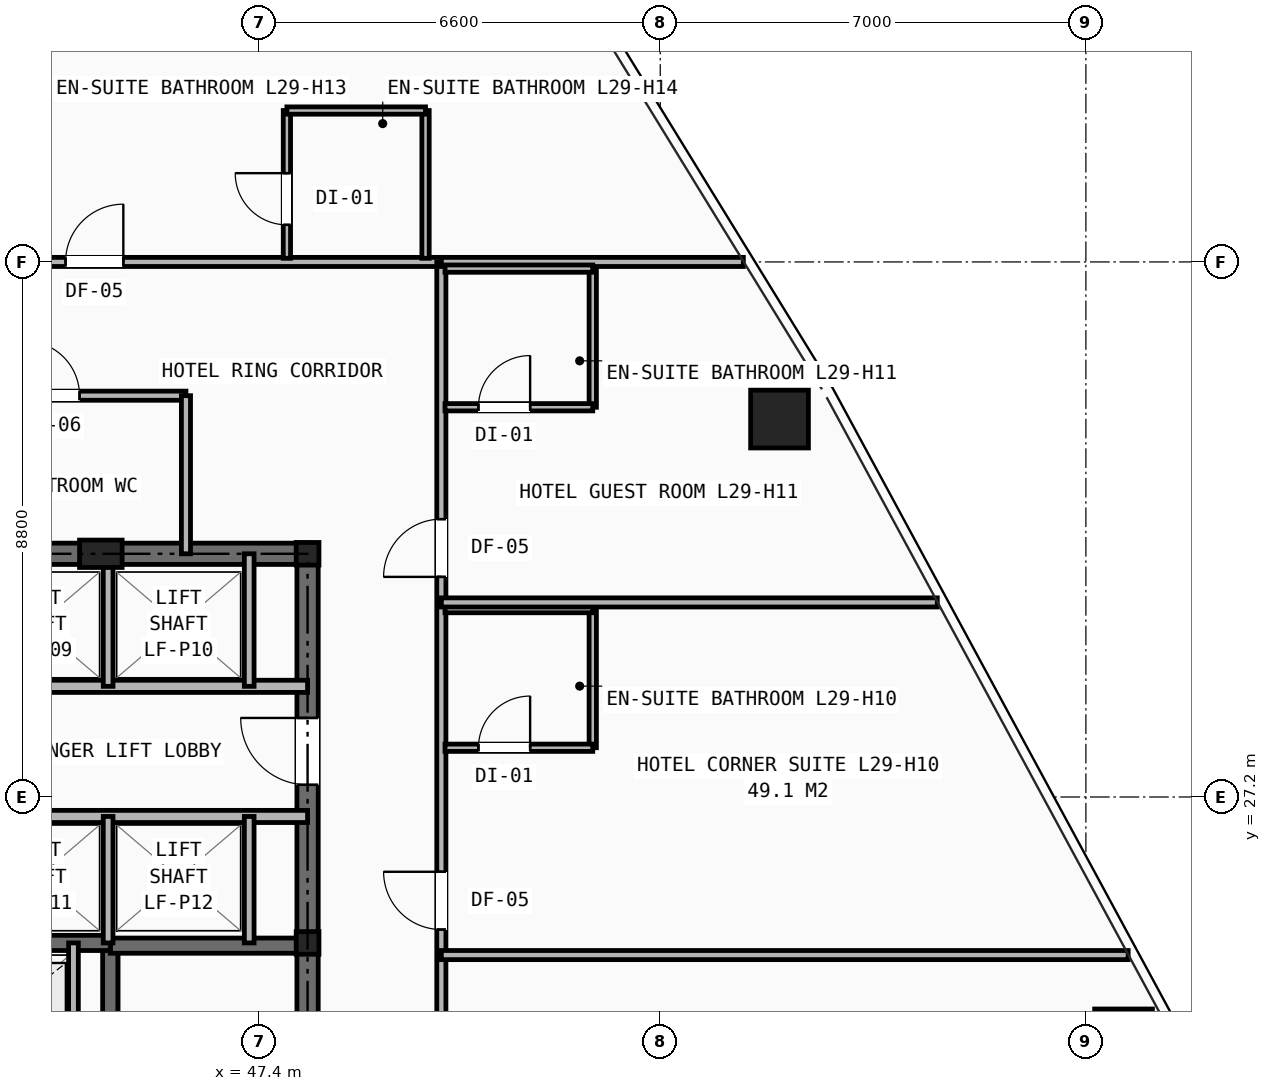
"""IFC4 building model, lengths in metres.
Left out: names, types, materials, properties, quantities, classifications, styles, units other than length and angle.
Written with IfcOpenShell. Run it as: python <this file> out.ifc"""

import sys

from ifc_helpers import new_model, si_unit, direction, frame, frame_2d, origin, origin_2d, place, context, subcontext, project, spatial, rectangle, hollow_rectangle, i_section, extrude, element, fill, save


model = new_model("IFC4")
c1 = context("Model", 3, precision=1e-05, world=origin(), true_north=direction((0.0, 1.0)))
c2 = subcontext(c1, "Body", "Model", "MODEL_VIEW")
j1 = project(units=[si_unit("LENGTHUNIT", "METRE"), si_unit("PLANEANGLEUNIT", "RADIAN")], contexts=[c1])
p1 = place(None, origin())
s1 = spatial("IfcSite", under=j1, at=p1, CompositionType="ELEMENT")
p2 = place(p1, origin())
s2 = spatial("IfcBuilding", under=s1, at=p2, CompositionType="ELEMENT")
p3 = place(p2, frame((0.0, 0.0, 102.2)))
s3 = spatial("IfcBuildingStorey", under=s2, at=p3, CompositionType="ELEMENT", Elevation=102.2)
for number, where, z_axis, x_axis in (
    (1, (48.2, 24.8, 0.0), (0.0, 0.0, 1.0), (1.0, 0.0, 0.0)),
    (2, (48.2, 31.2, 0.0), (0.0, 0.0, 1.0), (1.0, 0.0, 0.0)),
):
    element("IfcColumn", number, at=place(p3, frame(where, z_axis=z_axis, x_axis=x_axis)), inside=s3, PredefinedType="COLUMN", context=c2, shape_type="SweptSolid", body=[
        extrude(i_section(OverallWidth=0.374, OverallDepth=0.372, WebThickness=0.016, FlangeThickness=0.026, at=origin_2d()), origin(), (0.0, 0.0, 1.0), 3.2),
    ])
p4 = place(p3, frame((44.8, 31.2, 0.0), z_axis=(0.0, 0.0, 1.0), x_axis=(1.0, 0.0, 0.0)))
e3 = element("IfcColumn", 3, at=p4, inside=s3, PredefinedType="PILASTER", context=c2, shape_type="SweptSolid", body=[
    extrude(rectangle(XDim=0.7, YDim=0.45, at=origin_2d()), origin(), (0.0, 0.0, 1.0), 3.2),
])
for number, where, z_axis, x_axis in (
    (4, (61.619, 23.238, 0.0), (0.0, 0.0, 1.0), (1.0, 0.0, 0.0)),
    (5, (55.962, 33.416, 0.0), (0.0, 0.0, 1.0), (1.0, 0.0, 0.0)),
):
    element("IfcColumn", number, at=place(p3, frame(where, z_axis=z_axis, x_axis=x_axis)), inside=s3, PredefinedType="COLUMN", context=c2, shape_type="SweptSolid", body=[
        extrude(hollow_rectangle(XDim=0.95, YDim=0.95, WallThickness=0.065, at=origin_2d()), origin(), (0.0, 0.0, 1.0), 3.2),
    ])
p5 = place(p3, frame((31.8, 31.2, 0.0), z_axis=(0.0, 0.0, 1.0), x_axis=(1.0, 0.0, 0.0)))
e6 = element("IfcWall", 6, at=p5, inside=s3, PredefinedType="SHEAR", context=c2, shape_type="SweptSolid", body=[
    extrude(rectangle(XDim=16.4, YDim=0.35, at=frame_2d((8.2, 0.0))), origin(), (0.0, 0.0, 1.0), 2.97),
])
p6 = place(p3, frame((48.2, 16.4, 0.0), z_axis=(0.0, 0.0, 1.0), x_axis=(0.0, 1.0, 0.0)))
e7 = element("IfcWall", 7, at=p6, inside=s3, PredefinedType="SHEAR", context=c2, shape_type="SweptSolid", body=[
    extrude(rectangle(XDim=14.8, YDim=0.35, at=frame_2d((7.4, 0.0))), origin(), (0.0, 0.0, 1.0), 2.97),
])
p7 = place(p6, frame((11.0, 0.0, 0.0)))
e8 = element("IfcOpeningElement", 8, at=p7, cuts=e7, PredefinedType="OPENING", context=c2, shape_type="SweptSolid", body=[
    extrude(rectangle(XDim=1.1, YDim=2.15, at=frame_2d((0.55, 1.075))), frame((0.0, 0.185, 0.0), z_axis=(0.0, -1.0, 0.0), x_axis=(1.0, 0.0, 0.0)), (0.0, 0.0, 1.0), 0.37),
])
p8 = place(p3, frame((44.955, 16.4, 0.0), z_axis=(0.0, 0.0, 1.0), x_axis=(0.0, 1.0, 0.0)))
e9 = element("IfcWall", 9, at=p8, inside=s3, PredefinedType="SHEAR", context=c2, shape_type="SweptSolid", body=[
    extrude(rectangle(XDim=8.4, YDim=0.25, at=frame_2d((4.2, 0.0))), origin(), (0.0, 0.0, 1.0), 2.97),
])
p9 = place(p8, frame((0.45, 0.0, 0.0)))
e10 = element("IfcOpeningElement", 10, at=p9, cuts=e9, PredefinedType="OPENING", context=c2, shape_type="SweptSolid", body=[
    extrude(rectangle(XDim=0.95, YDim=2.1, at=frame_2d((0.475, 1.05))), frame((0.0, 0.135, 0.0), z_axis=(0.0, -1.0, 0.0), x_axis=(1.0, 0.0, 0.0)), (0.0, 0.0, 1.0), 0.27),
])
p10 = place(p3, frame((44.955, 24.755, 0.0), z_axis=(0.0, 0.0, 1.0), x_axis=(1.0, 0.0, 0.0)))
e11 = element("IfcWall", 11, at=p10, inside=s3, PredefinedType="SHEAR", context=c2, shape_type="SweptSolid", body=[
    extrude(rectangle(XDim=3.245, YDim=0.25, at=frame_2d((1.623, 0.0))), origin(), (0.0, 0.0, 1.0), 2.97),
])
p11 = place(p3, frame((35.045, 24.8, 0.0), z_axis=(0.0, 0.0, 1.0), x_axis=(1.0, 0.0, 0.0)))
e12 = element("IfcWall", 12, at=p11, inside=s3, PredefinedType="SHEAR", context=c2, shape_type="SweptSolid", body=[
    extrude(rectangle(XDim=9.91, YDim=0.25, at=frame_2d((4.955, 0.0))), origin(), (0.0, 0.0, 1.0), 2.97),
])
p12 = place(p3, frame((44.35, 22.48, 0.0), z_axis=(0.0, 0.0, 1.0), x_axis=(0.0, 1.0, 0.0)))
e13 = element("IfcWall", 13, at=p12, inside=s3, PredefinedType="SOLIDWALL", context=c2, shape_type="SweptSolid", body=[
    extrude(rectangle(XDim=2.32, YDim=0.16, at=frame_2d((1.16, 0.0))), origin(), (0.0, 0.0, 1.0), 2.97),
])
p13 = place(p3, frame((31.8, 29.02, 0.0), z_axis=(0.0, 0.0, 1.0), x_axis=(1.0, 0.0, 0.0)))
e14 = element("IfcWall", 14, at=p13, inside=s3, PredefinedType="SOLIDWALL", context=c2, shape_type="SweptSolid", body=[
    extrude(rectangle(XDim=16.4, YDim=0.2, at=frame_2d((8.2, 0.0))), origin(), (0.0, 0.0, 1.0), 2.421),
])
p14 = place(p13, frame((0.55, 0.0, 0.0)))
e15 = element("IfcOpeningElement", 15, at=p14, cuts=e14, PredefinedType="OPENING", context=c2, shape_type="SweptSolid", body=[
    extrude(rectangle(XDim=0.85, YDim=2.05, at=frame_2d((0.425, 1.025))), frame((0.0, 0.11, 0.0), z_axis=(0.0, -1.0, 0.0), x_axis=(1.0, 0.0, 0.0)), (0.0, 0.0, 1.0), 0.22),
])
p15 = place(p13, frame((2.55, 0.0, 0.0)))
e16 = element("IfcOpeningElement", 16, at=p15, cuts=e14, PredefinedType="OPENING", context=c2, shape_type="SweptSolid", body=[
    extrude(rectangle(XDim=1.1, YDim=2.15, at=frame_2d((0.55, 1.075))), frame((0.0, 0.11, 0.0), z_axis=(0.0, -1.0, 0.0), x_axis=(1.0, 0.0, 0.0)), (0.0, 0.0, 1.0), 0.22),
])
p16 = place(p13, frame((4.71, 0.0, 0.0)))
e17 = element("IfcOpeningElement", 17, at=p16, cuts=e14, PredefinedType="OPENING", context=c2, shape_type="SweptSolid", body=[
    extrude(rectangle(XDim=1.1, YDim=2.15, at=frame_2d((0.55, 1.075))), frame((0.0, 0.11, 0.0), z_axis=(0.0, -1.0, 0.0), x_axis=(1.0, 0.0, 0.0)), (0.0, 0.0, 1.0), 0.22),
])
p17 = place(p13, frame((6.87, 0.0, 0.0)))
e18 = element("IfcOpeningElement", 18, at=p17, cuts=e14, PredefinedType="OPENING", context=c2, shape_type="SweptSolid", body=[
    extrude(rectangle(XDim=1.1, YDim=2.15, at=frame_2d((0.55, 1.075))), frame((0.0, 0.11, 0.0), z_axis=(0.0, -1.0, 0.0), x_axis=(1.0, 0.0, 0.0)), (0.0, 0.0, 1.0), 0.22),
])
p18 = place(p13, frame((9.03, 0.0, 0.0)))
e19 = element("IfcOpeningElement", 19, at=p18, cuts=e14, PredefinedType="OPENING", context=c2, shape_type="SweptSolid", body=[
    extrude(rectangle(XDim=1.1, YDim=2.15, at=frame_2d((0.55, 1.075))), frame((0.0, 0.11, 0.0), z_axis=(0.0, -1.0, 0.0), x_axis=(1.0, 0.0, 0.0)), (0.0, 0.0, 1.0), 0.22),
])
p19 = place(p3, frame((33.82, 26.88, 0.0), z_axis=(0.0, 0.0, 1.0), x_axis=(1.0, 0.0, 0.0)))
e20 = element("IfcWall", 20, at=p19, inside=s3, PredefinedType="SOLIDWALL", context=c2, shape_type="SweptSolid", body=[
    extrude(rectangle(XDim=14.38, YDim=0.2, at=frame_2d((7.19, 0.0))), origin(), (0.0, 0.0, 1.0), 2.421),
])
for number, where, z_axis, x_axis in (
    (21, (44.92, 29.02, 0.0), (0.0, 0.0, 1.0), (0.0, 1.0, 0.0)),
    (22, (47.24, 29.02, 0.0), (0.0, 0.0, 1.0), (0.0, 1.0, 0.0)),
):
    element("IfcWall", number, at=place(p3, frame(where, z_axis=z_axis, x_axis=x_axis)), inside=s3, PredefinedType="SOLIDWALL", context=c2, shape_type="SweptSolid", body=[
        extrude(rectangle(XDim=2.18, YDim=0.16, at=frame_2d((1.09, 0.0))), origin(), (0.0, 0.0, 1.0), 2.421),
    ])
for number, where, z_axis, x_axis in (
    (23, (44.92, 24.8, 0.0), (0.0, 0.0, 1.0), (0.0, 1.0, 0.0)),
    (24, (47.24, 24.8, 0.0), (0.0, 0.0, 1.0), (0.0, 1.0, 0.0)),
):
    element("IfcWall", number, at=place(p3, frame(where, z_axis=z_axis, x_axis=x_axis)), inside=s3, PredefinedType="SOLIDWALL", context=c2, shape_type="SweptSolid", body=[
        extrude(rectangle(XDim=2.08, YDim=0.16, at=frame_2d((1.04, 0.0))), origin(), (0.0, 0.0, 1.0), 2.97),
    ])
p20 = place(p3, frame((33.2, 33.8, 0.0), z_axis=(0.0, 0.0, 1.0), x_axis=(1.0, 0.0, 0.0)))
e25 = element("IfcWall", 25, at=p20, inside=s3, PredefinedType="PARTITIONING", context=c2, shape_type="SweptSolid", body=[
    extrude(rectangle(XDim=13.0, YDim=0.15, at=frame_2d((6.5, 0.0))), origin(), (0.0, 0.0, 1.0), 2.97),
])
p21 = place(p20, frame((1.7, 0.0, 0.0)))
e26 = element("IfcOpeningElement", 26, at=p21, cuts=e25, PredefinedType="OPENING", context=c2, shape_type="SweptSolid", body=[
    extrude(rectangle(XDim=0.9, YDim=2.1, at=frame_2d((0.45, 1.05))), frame((0.0, 0.085, 0.0), z_axis=(0.0, -1.0, 0.0), x_axis=(1.0, 0.0, 0.0)), (0.0, 0.0, 1.0), 0.17),
])
p22 = place(p20, frame((6.0, 0.0, 0.0)))
e27 = element("IfcOpeningElement", 27, at=p22, cuts=e25, PredefinedType="OPENING", context=c2, shape_type="SweptSolid", body=[
    extrude(rectangle(XDim=0.9, YDim=2.1, at=frame_2d((0.45, 1.05))), frame((0.0, 0.085, 0.0), z_axis=(0.0, -1.0, 0.0), x_axis=(1.0, 0.0, 0.0)), (0.0, 0.0, 1.0), 0.17),
])
p23 = place(p20, frame((10.35, 0.0, 0.0)))
e28 = element("IfcOpeningElement", 28, at=p23, cuts=e25, PredefinedType="OPENING", context=c2, shape_type="SweptSolid", body=[
    extrude(rectangle(XDim=0.9, YDim=2.1, at=frame_2d((0.45, 1.05))), frame((0.0, 0.085, 0.0), z_axis=(0.0, -1.0, 0.0), x_axis=(1.0, 0.0, 0.0)), (0.0, 0.0, 1.0), 0.17),
])
p24 = place(p3, frame((46.2, 31.2, 0.0), z_axis=(0.0, 0.0, 1.0), x_axis=(0.0, 1.0, 0.0)))
e29 = element("IfcWall", 29, at=p24, inside=s3, PredefinedType="PARTITIONING", context=c2, shape_type="SweptSolid", body=[
    extrude(rectangle(XDim=2.6, YDim=0.15, at=frame_2d((1.3, 0.0))), origin(), (0.0, 0.0, 1.0), 2.421),
])
p25 = place(p3, frame((40.75, 36.0, 0.0), z_axis=(0.0, 0.0, 1.0), x_axis=(1.0, 0.0, 0.0)))
e30 = element("IfcWall", 30, at=p25, inside=s3, PredefinedType="PARTITIONING", context=c2, shape_type="SweptSolid", body=[
    extrude(rectangle(XDim=9.65, YDim=0.15, at=frame_2d((4.825, 0.0))), origin(), (0.0, 0.0, 1.0), 2.503),
])
p26 = place(p25, frame((3.47, 0.0, 0.0)))
e31 = element("IfcOpeningElement", 31, at=p26, cuts=e30, PredefinedType="OPENING", context=c2, shape_type="SweptSolid", body=[
    extrude(rectangle(XDim=0.95, YDim=2.1, at=frame_2d((0.475, 1.05))), frame((0.0, 0.085, 0.0), z_axis=(0.0, -1.0, 0.0), x_axis=(1.0, 0.0, 0.0)), (0.0, 0.0, 1.0), 0.17),
])
p27 = place(p3, frame((50.4, 14.1, 0.0), z_axis=(0.0, 0.0, 1.0), x_axis=(0.0, 1.0, 0.0)))
e32 = element("IfcWall", 32, at=p27, inside=s3, PredefinedType="PARTITIONING", context=c2, shape_type="SweptSolid", body=[
    extrude(rectangle(XDim=21.9, YDim=0.15, at=frame_2d((10.95, 0.0))), origin(), (0.0, 0.0, 1.0), 2.421),
])
p28 = place(p27, frame((0.42, 0.0, 0.0)))
e33 = element("IfcOpeningElement", 33, at=p28, cuts=e32, PredefinedType="OPENING", context=c2, shape_type="SweptSolid", body=[
    extrude(rectangle(XDim=0.95, YDim=2.1, at=frame_2d((0.475, 1.05))), frame((0.0, 0.085, 0.0), z_axis=(0.0, -1.0, 0.0), x_axis=(1.0, 0.0, 0.0)), (0.0, 0.0, 1.0), 0.17),
])
p29 = place(p27, frame((5.52, 0.0, 0.0)))
e34 = element("IfcOpeningElement", 34, at=p29, cuts=e32, PredefinedType="OPENING", context=c2, shape_type="SweptSolid", body=[
    extrude(rectangle(XDim=0.95, YDim=2.1, at=frame_2d((0.475, 1.05))), frame((0.0, 0.085, 0.0), z_axis=(0.0, -1.0, 0.0), x_axis=(1.0, 0.0, 0.0)), (0.0, 0.0, 1.0), 0.17),
])
p30 = place(p27, frame((10.92, 0.0, 0.0)))
e35 = element("IfcOpeningElement", 35, at=p30, cuts=e32, PredefinedType="OPENING", context=c2, shape_type="SweptSolid", body=[
    extrude(rectangle(XDim=0.95, YDim=2.1, at=frame_2d((0.475, 1.05))), frame((0.0, 0.085, 0.0), z_axis=(0.0, -1.0, 0.0), x_axis=(1.0, 0.0, 0.0)), (0.0, 0.0, 1.0), 0.17),
])
p31 = place(p27, frame((16.72, 0.0, 0.0)))
e36 = element("IfcOpeningElement", 36, at=p31, cuts=e32, PredefinedType="OPENING", context=c2, shape_type="SweptSolid", body=[
    extrude(rectangle(XDim=0.95, YDim=2.1, at=frame_2d((0.475, 1.05))), frame((0.0, 0.085, 0.0), z_axis=(0.0, -1.0, 0.0), x_axis=(1.0, 0.0, 0.0)), (0.0, 0.0, 1.0), 0.17),
])
p32 = place(p3, frame((50.4, 36.0, 0.0), z_axis=(0.0, 0.0, 1.0), x_axis=(1.0, 0.0, 0.0)))
e37 = element("IfcWall", 37, at=p32, inside=s3, PredefinedType="PARTITIONING", context=c2, shape_type="SweptSolid", body=[
    extrude(rectangle(XDim=4.967, YDim=0.15, at=frame_2d((2.483, 0.0))), origin(), (0.0, 0.0, 1.0), 2.258),
])
p33 = place(p3, frame((50.4, 24.6, 0.0), z_axis=(0.0, 0.0, 1.0), x_axis=(1.0, 0.0, 0.0)))
e38 = element("IfcWall", 38, at=p33, inside=s3, PredefinedType="PARTITIONING", context=c2, shape_type="SweptSolid", body=[
    extrude(rectangle(XDim=11.295, YDim=0.15, at=frame_2d((5.648, 0.0))), origin(), (0.0, 0.0, 1.0), 2.258),
])
p34 = place(p3, frame((52.89, 28.01, 0.0), z_axis=(0.0, 0.0, 1.0), x_axis=(0.0, 1.0, 0.0)))
e39 = element("IfcWall", 39, at=p34, inside=s3, PredefinedType="PARTITIONING", context=c2, shape_type="SweptSolid", body=[
    extrude(rectangle(XDim=2.28, YDim=0.12, at=frame_2d((1.14, 0.0))), origin(), (0.0, 0.0, 1.0), 2.97),
])
p35 = place(p3, frame((50.46, 28.01, 0.0), z_axis=(0.0, 0.0, 1.0), x_axis=(1.0, 0.0, 0.0)))
e40 = element("IfcWall", 40, at=p35, inside=s3, PredefinedType="PARTITIONING", context=c2, shape_type="SweptSolid", body=[
    extrude(rectangle(XDim=2.43, YDim=0.12, at=frame_2d((1.215, 0.0))), origin(), (0.0, 0.0, 1.0), 2.97),
])
p36 = place(p35, frame((0.55, 0.0, 0.0)))
e41 = element("IfcOpeningElement", 41, at=p36, cuts=e40, PredefinedType="OPENING", context=c2, shape_type="SweptSolid", body=[
    extrude(rectangle(XDim=0.85, YDim=2.05, at=frame_2d((0.425, 1.025))), frame((0.0, 0.07, 0.0), z_axis=(0.0, -1.0, 0.0), x_axis=(1.0, 0.0, 0.0)), (0.0, 0.0, 1.0), 0.14),
])
p37 = place(p3, frame((50.46, 30.29, 0.0), z_axis=(0.0, 0.0, 1.0), x_axis=(1.0, 0.0, 0.0)))
e42 = element("IfcWall", 42, at=p37, inside=s3, PredefinedType="PARTITIONING", context=c2, shape_type="SweptSolid", body=[
    extrude(rectangle(XDim=2.43, YDim=0.12, at=frame_2d((1.215, 0.0))), origin(), (0.0, 0.0, 1.0), 2.97),
])
p38 = place(p3, frame((50.4, 30.4, 0.0), z_axis=(0.0, 0.0, 1.0), x_axis=(1.0, 0.0, 0.0)))
e43 = element("IfcWall", 43, at=p38, inside=s3, PredefinedType="PARTITIONING", context=c2, shape_type="SweptSolid", body=[
    extrude(rectangle(XDim=8.156, YDim=0.15, at=frame_2d((4.078, 0.0))), origin(), (0.0, 0.0, 1.0), 2.258),
])
p39 = place(p3, frame((52.89, 33.61, 0.0), z_axis=(0.0, 0.0, 1.0), x_axis=(0.0, 1.0, 0.0)))
e44 = element("IfcWall", 44, at=p39, inside=s3, PredefinedType="PARTITIONING", context=c2, shape_type="SweptSolid", body=[
    extrude(rectangle(XDim=2.28, YDim=0.12, at=frame_2d((1.14, 0.0))), origin(), (0.0, 0.0, 1.0), 2.97),
])
p40 = place(p3, frame((50.46, 33.61, 0.0), z_axis=(0.0, 0.0, 1.0), x_axis=(1.0, 0.0, 0.0)))
e45 = element("IfcWall", 45, at=p40, inside=s3, PredefinedType="PARTITIONING", context=c2, shape_type="SweptSolid", body=[
    extrude(rectangle(XDim=2.43, YDim=0.12, at=frame_2d((1.215, 0.0))), origin(), (0.0, 0.0, 1.0), 2.503),
])
p41 = place(p40, frame((0.55, 0.0, 0.0)))
e46 = element("IfcOpeningElement", 46, at=p41, cuts=e45, PredefinedType="OPENING", context=c2, shape_type="SweptSolid", body=[
    extrude(rectangle(XDim=0.85, YDim=2.05, at=frame_2d((0.425, 1.025))), frame((0.0, 0.07, 0.0), z_axis=(0.0, -1.0, 0.0), x_axis=(1.0, 0.0, 0.0)), (0.0, 0.0, 1.0), 0.14),
])
p42 = place(p3, frame((50.46, 35.89, 0.0), z_axis=(0.0, 0.0, 1.0), x_axis=(1.0, 0.0, 0.0)))
e47 = element("IfcWall", 47, at=p42, inside=s3, PredefinedType="PARTITIONING", context=c2, shape_type="SweptSolid", body=[
    extrude(rectangle(XDim=2.43, YDim=0.12, at=frame_2d((1.215, 0.0))), origin(), (0.0, 0.0, 1.0), 2.97),
])
p43 = place(p3, frame((47.86, 36.06, 0.0), z_axis=(0.0, 0.0, 1.0), x_axis=(0.0, 1.0, 0.0)))
e48 = element("IfcWall", 48, at=p43, inside=s3, PredefinedType="PARTITIONING", context=c2, shape_type="SweptSolid", body=[
    extrude(rectangle(XDim=2.43, YDim=0.12, at=frame_2d((1.215, 0.0))), origin(), (0.0, 0.0, 1.0), 2.503),
])
p44 = place(p43, frame((0.55, 0.0, 0.0)))
e49 = element("IfcOpeningElement", 49, at=p44, cuts=e48, PredefinedType="OPENING", context=c2, shape_type="SweptSolid", body=[
    extrude(rectangle(XDim=0.85, YDim=2.05, at=frame_2d((0.425, 1.025))), frame((0.0, 0.07, 0.0), z_axis=(0.0, -1.0, 0.0), x_axis=(1.0, 0.0, 0.0)), (0.0, 0.0, 1.0), 0.14),
])
p45 = place(p3, frame((50.14, 36.06, 0.0), z_axis=(0.0, 0.0, 1.0), x_axis=(0.0, 1.0, 0.0)))
e50 = element("IfcWall", 50, at=p45, inside=s3, PredefinedType="PARTITIONING", context=c2, shape_type="SweptSolid", body=[
    extrude(rectangle(XDim=2.43, YDim=0.12, at=frame_2d((1.215, 0.0))), origin(), (0.0, 0.0, 1.0), 2.97),
])
p46 = place(p3, frame((47.86, 38.49, 0.0), z_axis=(0.0, 0.0, 1.0), x_axis=(1.0, 0.0, 0.0)))
e51 = element("IfcWall", 51, at=p46, inside=s3, PredefinedType="PARTITIONING", context=c2, shape_type="SweptSolid", body=[
    extrude(rectangle(XDim=2.28, YDim=0.12, at=frame_2d((1.14, 0.0))), origin(), (0.0, 0.0, 1.0), 2.503),
])
p47 = place(p7, origin())
e52 = element("IfcDoor", 52, at=p47, inside=s3, OperationType="SINGLE_SWING_RIGHT", PredefinedType="DOOR", context=c2, shape_type="SweptSolid", body=[
    extrude(rectangle(XDim=1.1, YDim=2.15, at=frame_2d((0.55, 1.075))), frame((0.0, 0.025, 0.0), z_axis=(0.0, -1.0, 0.0), x_axis=(1.0, 0.0, 0.0)), (0.0, 0.0, 1.0), 0.05),
])
fill(e8, e52)
p48 = place(p23, origin())
e53 = element("IfcDoor", 53, at=p48, inside=s3, OperationType="SINGLE_SWING_LEFT", PredefinedType="DOOR", context=c2, shape_type="SweptSolid", body=[
    extrude(rectangle(XDim=0.9, YDim=2.1, at=frame_2d((0.45, 1.05))), frame((0.0, 0.025, 0.0), z_axis=(0.0, -1.0, 0.0), x_axis=(1.0, 0.0, 0.0)), (0.0, 0.0, 1.0), 0.05),
])
fill(e28, e53)
p49 = place(p30, origin())
e54 = element("IfcDoor", 54, at=p49, inside=s3, OperationType="SINGLE_SWING_RIGHT", PredefinedType="DOOR", context=c2, shape_type="SweptSolid", body=[
    extrude(rectangle(XDim=0.95, YDim=2.1, at=frame_2d((0.475, 1.05))), frame((0.0, 0.025, 0.0), z_axis=(0.0, -1.0, 0.0), x_axis=(1.0, 0.0, 0.0)), (0.0, 0.0, 1.0), 0.05),
])
fill(e35, e54)
p50 = place(p36, origin())
e55 = element("IfcDoor", 55, at=p50, inside=s3, OperationType="SINGLE_SWING_RIGHT", PredefinedType="DOOR", context=c2, shape_type="SweptSolid", body=[
    extrude(rectangle(XDim=0.85, YDim=2.05, at=frame_2d((0.425, 1.025))), frame((0.0, 0.025, 0.0), z_axis=(0.0, -1.0, 0.0), x_axis=(1.0, 0.0, 0.0)), (0.0, 0.0, 1.0), 0.05),
])
fill(e41, e55)
p51 = place(p31, origin())
e56 = element("IfcDoor", 56, at=p51, inside=s3, OperationType="SINGLE_SWING_LEFT", PredefinedType="DOOR", context=c2, shape_type="SweptSolid", body=[
    extrude(rectangle(XDim=0.95, YDim=2.1, at=frame_2d((0.475, 1.05))), frame((0.0, 0.025, 0.0), z_axis=(0.0, -1.0, 0.0), x_axis=(1.0, 0.0, 0.0)), (0.0, 0.0, 1.0), 0.05),
])
fill(e36, e56)
p52 = place(p41, origin())
e57 = element("IfcDoor", 57, at=p52, inside=s3, OperationType="SINGLE_SWING_RIGHT", PredefinedType="DOOR", context=c2, shape_type="SweptSolid", body=[
    extrude(rectangle(XDim=0.85, YDim=2.05, at=frame_2d((0.425, 1.025))), frame((0.0, 0.025, 0.0), z_axis=(0.0, -1.0, 0.0), x_axis=(1.0, 0.0, 0.0)), (0.0, 0.0, 1.0), 0.05),
])
fill(e46, e57)
p53 = place(p26, origin())
e58 = element("IfcDoor", 58, at=p53, inside=s3, OperationType="SINGLE_SWING_RIGHT", PredefinedType="DOOR", context=c2, shape_type="SweptSolid", body=[
    extrude(rectangle(XDim=0.95, YDim=2.1, at=frame_2d((0.475, 1.05))), frame((0.0, 0.025, 0.0), z_axis=(0.0, -1.0, 0.0), x_axis=(1.0, 0.0, 0.0)), (0.0, 0.0, 1.0), 0.05),
])
fill(e31, e58)
p54 = place(p44, origin())
e59 = element("IfcDoor", 59, at=p54, inside=s3, OperationType="SINGLE_SWING_RIGHT", PredefinedType="DOOR", context=c2, shape_type="SweptSolid", body=[
    extrude(rectangle(XDim=0.85, YDim=2.05, at=frame_2d((0.425, 1.025))), frame((0.0, 0.025, 0.0), z_axis=(0.0, -1.0, 0.0), x_axis=(1.0, 0.0, 0.0)), (0.0, 0.0, 1.0), 0.05),
])
fill(e49, e59)
save(model, sys.argv[1])
